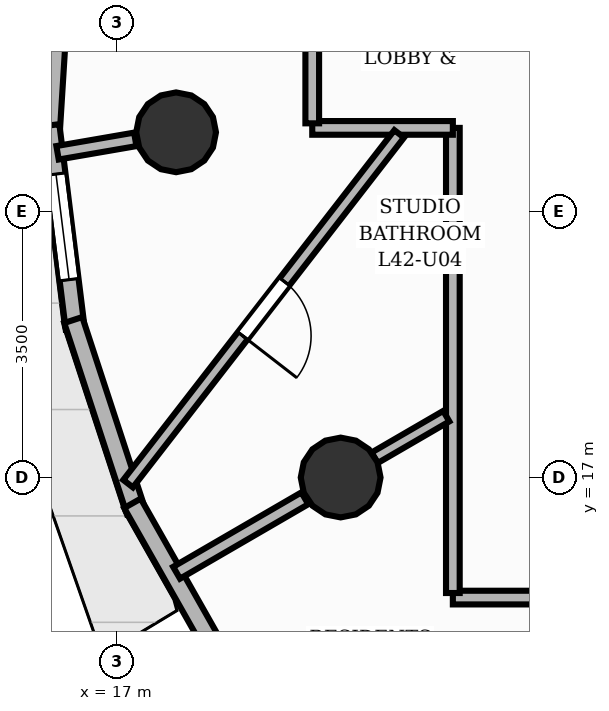
"""IFC4 building model, lengths in metres.
Left out: names, types, materials, properties, quantities, classifications, styles, units other than length and angle.
Written with IfcOpenShell. Run it as: python <this file> out.ifc"""

import sys

from ifc_helpers import new_model, si_unit, direction, frame, frame_2d, origin, origin_2d, place, context, subcontext, project, spatial, rectangle, circle, extrude, element, fill, save


model = new_model("IFC4")
c1 = context("Model", 3, precision=1e-05, world=origin(), true_north=direction((0.0, 1.0)))
c2 = subcontext(c1, "Body", "Model", "MODEL_VIEW")
j1 = project(units=[si_unit("LENGTHUNIT", "METRE"), si_unit("PLANEANGLEUNIT", "RADIAN")], contexts=[c1])
p1 = place(None, origin())
s1 = spatial("IfcSite", under=j1, at=p1, CompositionType="ELEMENT")
p2 = place(p1, origin())
s2 = spatial("IfcBuilding", under=s1, at=p2, CompositionType="ELEMENT")
p3 = place(p2, frame((0.0, 0.0, 142.56)))
s3 = spatial("IfcBuildingStorey", under=s2, at=p3, CompositionType="ELEMENT", Elevation=142.56)
for number, where, z_axis, x_axis in (
    (1, (17.779, 21.542, 0.0), (0.0, 0.0, 1.0), (1.0, 0.0, 0.0)),
    (2, (19.944, 17.0, 0.0), (0.0, 0.0, 1.0), (1.0, 0.0, 0.0)),
):
    element("IfcColumn", number, at=place(p3, frame(where, z_axis=z_axis, x_axis=x_axis)), inside=s3, PredefinedType="COLUMN", context=c2, shape_type="SweptSolid", body=[
        extrude(circle(Radius=0.525, at=origin_2d()), origin(), (0.0, 0.0, 1.0), 3.2),
    ])
p4 = place(p3, frame((16.122, 21.521, 0.0), z_axis=(0.0, 0.0, 1.0), x_axis=(0.062278868317, 0.998058787127, 0.0)))
e3 = element("IfcWall", 3, at=p4, inside=s3, PredefinedType="SOLIDWALL", context=c2, shape_type="SweptSolid", body=[
    extrude(rectangle(XDim=2.752, YDim=0.25, at=frame_2d((1.376, 0.0))), origin(), (0.0, 0.0, 1.0), 2.96),
])
p5 = place(p3, frame((16.451, 18.961, 0.0), z_axis=(0.0, 0.0, 1.0), x_axis=(-0.123197890413, 0.992382123881, 0.0)))
e4 = element("IfcWall", 4, at=p5, inside=s3, PredefinedType="SOLIDWALL", context=c2, shape_type="SweptSolid", body=[
    extrude(rectangle(XDim=2.693, YDim=0.25, at=frame_2d((1.347, 0.0))), origin(), (0.0, 0.0, 1.0), 2.96),
])
p6 = place(p5, frame((0.647, 0.0, 0.85)))
e5 = element("IfcOpeningElement", 5, at=p6, cuts=e4, PredefinedType="OPENING", context=c2, shape_type="SweptSolid", body=[
    extrude(rectangle(XDim=1.4, YDim=1.45, at=frame_2d((0.7, 0.725))), frame((0.0, 0.135, 0.0), z_axis=(0.0, -1.0, 0.0), x_axis=(1.0, 0.0, 0.0)), (0.0, 0.0, 1.0), 0.27),
])
p7 = place(p3, frame((17.251, 16.556, 0.0), z_axis=(0.0, 0.0, 1.0), x_axis=(-0.311522010952, 0.950238936633, 0.0)))
e6 = element("IfcWall", 6, at=p7, inside=s3, PredefinedType="SOLIDWALL", context=c2, shape_type="SweptSolid", body=[
    extrude(rectangle(XDim=2.648, YDim=0.25, at=frame_2d((1.324, 0.0))), origin(), (0.0, 0.0, 1.0), 2.96),
])
p8 = place(p3, frame((18.498, 14.377, 0.0), z_axis=(0.0, 0.0, 1.0), x_axis=(-0.492909281161, 0.870080709214, 0.0)))
e7 = element("IfcWall", 7, at=p8, inside=s3, PredefinedType="SOLIDWALL", context=c2, shape_type="SweptSolid", body=[
    extrude(rectangle(XDim=2.624, YDim=0.25, at=frame_2d((1.312, 0.0))), origin(), (0.0, 0.0, 1.0), 2.96),
])
p9 = place(p3, frame((17.242, 21.449, 0.0), z_axis=(0.0, 0.0, 1.0), x_axis=(-0.985390767806, -0.170308645474, 0.0)))
e8 = element("IfcWall", 8, at=p9, inside=s3, PredefinedType="PARTITIONING", context=c2, shape_type="SweptSolid", body=[
    extrude(rectangle(XDim=1.038, YDim=0.18, at=frame_2d((0.519, 0.0))), origin(), (0.0, 0.0, 1.0), 2.336),
])
p10 = place(p3, frame((19.472, 16.726, 0.0), z_axis=(0.0, 0.0, 1.0), x_axis=(-0.864802971131, -0.502111363268, 0.0)))
e9 = element("IfcWall", 9, at=p10, inside=s3, PredefinedType="PARTITIONING", context=c2, shape_type="SweptSolid", body=[
    extrude(rectangle(XDim=1.951, YDim=0.18, at=frame_2d((0.975, 0.0))), origin(), (0.0, 0.0, 1.0), 2.336),
])
p11 = place(p3, frame((39.08, 15.42, 0.0), z_axis=(0.0, 0.0, 1.0), x_axis=(-1.0, 0.0, 0.0)))
e10 = element("IfcWall", 10, at=p11, inside=s3, PredefinedType="PARTITIONING", context=c2, shape_type="SweptSolid", body=[
    extrude(rectangle(XDim=17.66, YDim=0.18, at=frame_2d((8.83, 0.0))), origin(), (0.0, 0.0, 1.0), 2.955),
])
p12 = place(p11, frame((7.368, 0.0, 0.0)))
e11 = element("IfcOpeningElement", 11, at=p12, cuts=e10, PredefinedType="OPENING", context=c2, shape_type="SweptSolid", body=[
    extrude(rectangle(XDim=0.9, YDim=2.1, at=frame_2d((0.45, 1.05))), frame((0.0, 0.1, 0.0), z_axis=(0.0, -1.0, 0.0), x_axis=(1.0, 0.0, 0.0)), (0.0, 0.0, 1.0), 0.2),
])
p13 = place(p11, frame((10.224, 0.0, 0.0)))
e12 = element("IfcOpeningElement", 12, at=p13, cuts=e10, PredefinedType="OPENING", context=c2, shape_type="SweptSolid", body=[
    extrude(rectangle(XDim=0.9, YDim=2.1, at=frame_2d((0.45, 1.05))), frame((0.0, 0.1, 0.0), z_axis=(0.0, -1.0, 0.0), x_axis=(1.0, 0.0, 0.0)), (0.0, 0.0, 1.0), 0.2),
])
p14 = place(p11, frame((14.353, 0.0, 0.0)))
e13 = element("IfcOpeningElement", 13, at=p14, cuts=e10, PredefinedType="OPENING", context=c2, shape_type="SweptSolid", body=[
    extrude(rectangle(XDim=0.9, YDim=2.1, at=frame_2d((0.45, 1.05))), frame((0.0, 0.1, 0.0), z_axis=(0.0, -1.0, 0.0), x_axis=(1.0, 0.0, 0.0)), (0.0, 0.0, 1.0), 0.2),
])
p15 = place(p3, frame((21.42, 15.48, 0.0), z_axis=(0.0, 0.0, 1.0), x_axis=(0.0, 1.0, 0.0)))
e14 = element("IfcWall", 14, at=p15, inside=s3, PredefinedType="PARTITIONING", context=c2, shape_type="SweptSolid", body=[
    extrude(rectangle(XDim=6.12, YDim=0.18, at=frame_2d((3.06, 0.0))), origin(), (0.0, 0.0, 1.0), 2.955),
])
p16 = place(p3, frame((21.42, 21.6, 0.0), z_axis=(0.0, 0.0, 1.0), x_axis=(-1.0, 0.0, 0.0)))
e15 = element("IfcWall", 15, at=p16, inside=s3, PredefinedType="PARTITIONING", context=c2, shape_type="SweptSolid", body=[
    extrude(rectangle(XDim=1.85, YDim=0.18, at=frame_2d((0.925, 0.0))), origin(), (0.0, 0.0, 1.0), 2.336),
])
p17 = place(p3, frame((19.57, 21.66, 0.0), z_axis=(0.0, 0.0, 1.0), x_axis=(0.0, 1.0, 0.0)))
e16 = element("IfcWall", 16, at=p17, inside=s3, PredefinedType="PARTITIONING", context=c2, shape_type="SweptSolid", body=[
    extrude(rectangle(XDim=4.74, YDim=0.18, at=frame_2d((2.37, 0.0))), origin(), (0.0, 0.0, 1.0), 2.955),
])
p18 = place(p3, frame((20.391, 17.26, 0.0), z_axis=(0.0, 0.0, 1.0), x_axis=(0.864719901707, 0.50225440923, 0.0)))
e17 = element("IfcWall", 17, at=p18, inside=s3, PredefinedType="PLUMBINGWALL", context=c2, shape_type="SweptSolid", body=[
    extrude(rectangle(XDim=1.09, YDim=0.16, at=frame_2d((0.545, 0.0))), origin(), (0.0, 0.0, 1.0), 2.336),
])
p19 = place(p3, frame((20.714, 21.521, 0.0), z_axis=(0.0, 0.0, 1.0), x_axis=(-0.612572320399, -0.790414544578, 0.0)))
e18 = element("IfcWall", 18, at=p19, inside=s3, PredefinedType="PLUMBINGWALL", context=c2, shape_type="SweptSolid", body=[
    extrude(rectangle(XDim=5.822, YDim=0.16, at=frame_2d((2.911, 0.0))), origin(), (0.0, 0.0, 1.0), 2.955),
])
p20 = place(p19, frame((2.461, 0.0, 0.0)))
e19 = element("IfcOpeningElement", 19, at=p20, cuts=e18, PredefinedType="OPENING", context=c2, shape_type="SweptSolid", body=[
    extrude(rectangle(XDim=0.9, YDim=2.1, at=frame_2d((0.45, 1.05))), frame((0.0, 0.09, 0.0), z_axis=(0.0, -1.0, 0.0), x_axis=(1.0, 0.0, 0.0)), (0.0, 0.0, 1.0), 0.18),
])
p21 = place(p6, origin())
e20 = element("IfcWindow", 20, at=p21, inside=s3, PartitioningType="SINGLE_PANEL", PredefinedType="WINDOW", context=c2, shape_type="SweptSolid", body=[
    extrude(rectangle(XDim=1.4, YDim=1.45, at=frame_2d((0.7, 0.725))), frame((0.0, 0.03, 0.0), z_axis=(0.0, -1.0, 0.0), x_axis=(1.0, 0.0, 0.0)), (0.0, 0.0, 1.0), 0.06),
])
fill(e5, e20)
p22 = place(p20, origin())
e21 = element("IfcDoor", 21, at=p22, inside=s3, OperationType="SINGLE_SWING_RIGHT", PredefinedType="DOOR", context=c2, shape_type="SweptSolid", body=[
    extrude(rectangle(XDim=0.9, YDim=2.1, at=frame_2d((0.45, 1.05))), frame((0.0, 0.025, 0.0), z_axis=(0.0, -1.0, 0.0), x_axis=(1.0, 0.0, 0.0)), (0.0, 0.0, 1.0), 0.05),
])
fill(e19, e21)
save(model, sys.argv[1])
